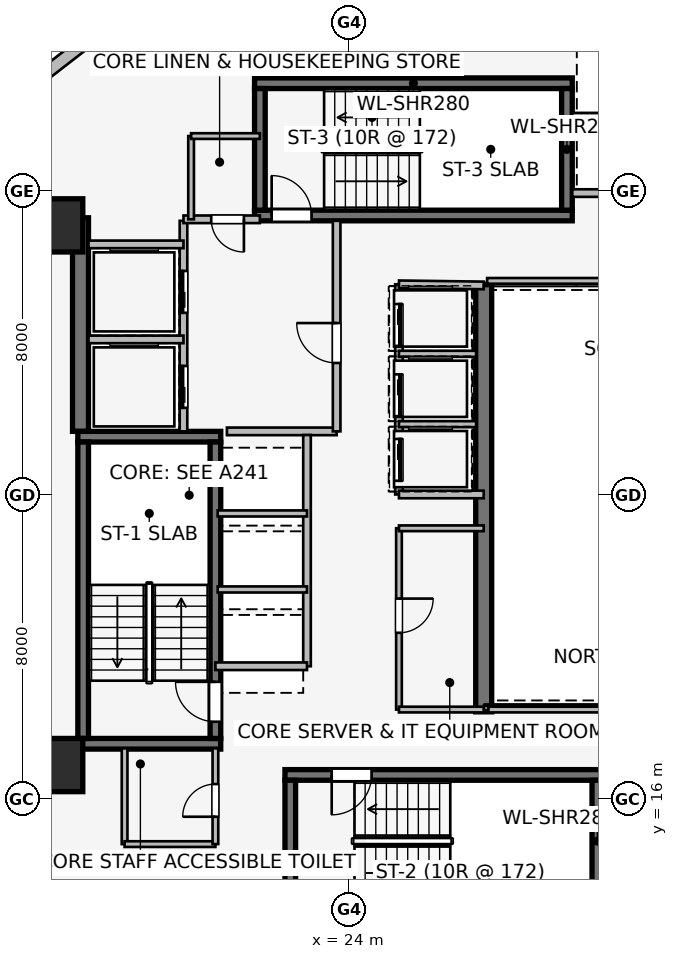
"""IFC4 building model, lengths in metres.
Left out: names, types, materials, properties, quantities, classifications, styles, units other than length and angle.
Written with IfcOpenShell. Run it as: python <this file> out.ifc"""

import sys

from ifc_helpers import new_model, si_unit, direction, frame, frame_2d, origin, origin_2d, place, context, subcontext, project, spatial, rectangle, extrude, element, fill, save


model = new_model("IFC4")
c1 = context("Model", 3, precision=1e-05, world=origin(), true_north=direction((0.0, 1.0)))
c2 = subcontext(c1, "Body", "Model", "MODEL_VIEW")
j1 = project(units=[si_unit("LENGTHUNIT", "METRE"), si_unit("PLANEANGLEUNIT", "RADIAN")], contexts=[c1])
p1 = place(None, origin())
s1 = spatial("IfcSite", under=j1, at=p1, CompositionType="ELEMENT")
p2 = place(p1, origin())
s2 = spatial("IfcBuilding", under=s1, at=p2, CompositionType="ELEMENT")
p3 = place(p2, frame((0.0, 0.0, 146.4)))
s3 = spatial("IfcBuildingStorey", under=s2, at=p3, CompositionType="ELEMENT", Elevation=146.4)
p4 = place(p3, frame((16.94, 25.68, 0.0), z_axis=(0.0, 0.0, 1.0), x_axis=(0.0, 1.0, 0.0)))
e1 = element("IfcWall", 1, at=p4, inside=s3, PredefinedType="SHEAR", context=c2, shape_type="SweptSolid", body=[
    extrude(rectangle(XDim=5.62, YDim=0.42, at=frame_2d((2.81, 0.0))), origin(), (0.0, 0.0, 1.0), 3.45),
])
p5 = place(p3, frame((27.55, 29.55, 0.0), z_axis=(0.0, 0.0, 1.0), x_axis=(0.0, -1.0, 0.0)))
e2 = element("IfcWall", 2, at=p5, inside=s3, PredefinedType="SHEAR", context=c2, shape_type="SweptSolid", body=[
    extrude(rectangle(XDim=11.25, YDim=0.42, at=frame_2d((5.625, 0.0))), origin(), (0.0, 0.0, 1.0), 3.45),
])
for number, where, z_axis, x_axis in (
    (3, (16.87, 17.46, 0.0), (0.0, 0.0, 1.0), (1.0, 0.0, 0.0)),
    (4, (20.63, 25.54, 0.0), (0.0, 0.0, 1.0), (-1.0, 0.0, 0.0)),
):
    element("IfcWall", number, at=place(p3, frame(where, z_axis=z_axis, x_axis=x_axis)), inside=s3, PredefinedType="SHEAR", context=c2, shape_type="SweptSolid", body=[
        extrude(rectangle(XDim=3.76, YDim=0.28, at=frame_2d((1.88, 0.0))), origin(), (0.0, 0.0, 1.0), 3.45),
    ])
p6 = place(p3, frame((17.01, 25.4, 0.0), z_axis=(0.0, 0.0, 1.0), x_axis=(0.0, -1.0, 0.0)))
e5 = element("IfcWall", 5, at=p6, inside=s3, PredefinedType="SHEAR", context=c2, shape_type="SweptSolid", body=[
    extrude(rectangle(XDim=7.8, YDim=0.28, at=frame_2d((3.9, 0.0))), origin(), (0.0, 0.0, 1.0), 3.45),
])
p7 = place(p3, frame((20.49, 17.6, 0.0), z_axis=(0.0, 0.0, 1.0), x_axis=(0.0, 1.0, 0.0)))
e6 = element("IfcWall", 6, at=p7, inside=s3, PredefinedType="SHEAR", context=c2, shape_type="SweptSolid", body=[
    extrude(rectangle(XDim=7.8, YDim=0.28, at=frame_2d((3.9, 0.0))), origin(), (0.0, 0.0, 1.0), 3.45),
])
p8 = place(p7, frame((0.44, 0.0, 0.0)))
e7 = element("IfcOpeningElement", 7, at=p8, cuts=e6, PredefinedType="OPENING", context=c2, shape_type="SweptSolid", body=[
    extrude(rectangle(XDim=1.05, YDim=2.0, at=frame_2d((0.525, 1.0))), frame((0.0, 0.15, 0.0), z_axis=(0.0, -1.0, 0.0), x_axis=(1.0, 0.0, 0.0)), (0.0, 0.0, 1.0), 0.3),
])
p9 = place(p3, frame((30.68, 16.64, 0.0), z_axis=(0.0, 0.0, 1.0), x_axis=(-1.0, 0.0, 0.0)))
e8 = element("IfcWall", 8, at=p9, inside=s3, PredefinedType="SHEAR", context=c2, shape_type="SweptSolid", body=[
    extrude(rectangle(XDim=8.36, YDim=0.28, at=frame_2d((4.18, 0.0))), origin(), (0.0, 0.0, 1.0), 3.45),
])
p10 = place(p9, frame((6.08, 0.0, 0.0)))
e9 = element("IfcOpeningElement", 9, at=p10, cuts=e8, PredefinedType="OPENING", context=c2, shape_type="SweptSolid", body=[
    extrude(rectangle(XDim=1.05, YDim=2.0, at=frame_2d((0.525, 1.0))), frame((0.0, 0.15, 0.0), z_axis=(0.0, -1.0, 0.0), x_axis=(1.0, 0.0, 0.0)), (0.0, 0.0, 1.0), 0.3),
])
for number, where, z_axis, x_axis in (
    (10, (22.46, 16.5, 0.0), (0.0, 0.0, 1.0), (0.0, -1.0, 0.0)),
    (11, (30.54, 13.3, 0.0), (0.0, 0.0, 1.0), (0.0, 1.0, 0.0)),
):
    element("IfcWall", number, at=place(p3, frame(where, z_axis=z_axis, x_axis=x_axis)), inside=s3, PredefinedType="SHEAR", context=c2, shape_type="SweptSolid", body=[
        extrude(rectangle(XDim=3.2, YDim=0.28, at=frame_2d((1.6, 0.0))), origin(), (0.0, 0.0, 1.0), 3.45),
    ])
p11 = place(p3, frame((21.52, 31.36, 0.0), z_axis=(0.0, 0.0, 1.0), x_axis=(1.0, 0.0, 0.0)))
e12 = element("IfcWall", 12, at=p11, inside=s3, PredefinedType="SHEAR", context=c2, shape_type="SweptSolid", body=[
    extrude(rectangle(XDim=8.36, YDim=0.28, at=frame_2d((4.18, 0.0))), origin(), (0.0, 0.0, 1.0), 3.45),
])
p12 = place(p11, frame((0.45, 0.0, 0.0)))
e13 = element("IfcOpeningElement", 13, at=p12, cuts=e12, PredefinedType="OPENING", context=c2, shape_type="SweptSolid", body=[
    extrude(rectangle(XDim=1.05, YDim=2.0, at=frame_2d((0.525, 1.0))), frame((0.0, 0.15, 0.0), z_axis=(0.0, -1.0, 0.0), x_axis=(1.0, 0.0, 0.0)), (0.0, 0.0, 1.0), 0.3),
])
p13 = place(p3, frame((29.88, 34.84, 0.0), z_axis=(0.0, 0.0, 1.0), x_axis=(-1.0, 0.0, 0.0)))
e14 = element("IfcWall", 14, at=p13, inside=s3, PredefinedType="SHEAR", context=c2, shape_type="SweptSolid", body=[
    extrude(rectangle(XDim=8.36, YDim=0.28, at=frame_2d((4.18, 0.0))), origin(), (0.0, 0.0, 1.0), 3.45),
])
for number, where, z_axis, x_axis in (
    (15, (21.66, 34.7, 0.0), (0.0, 0.0, 1.0), (0.0, -1.0, 0.0)),
    (16, (29.74, 31.5, 0.0), (0.0, 0.0, 1.0), (0.0, 1.0, 0.0)),
):
    element("IfcWall", number, at=place(p3, frame(where, z_axis=z_axis, x_axis=x_axis)), inside=s3, PredefinedType="SHEAR", context=c2, shape_type="SweptSolid", body=[
        extrude(rectangle(XDim=3.2, YDim=0.28, at=frame_2d((1.6, 0.0))), origin(), (0.0, 0.0, 1.0), 3.45),
    ])
for number, where, z_axis, x_axis in (
    (17, (16.3, 16.9, 0.0), (0.0, 0.0, 1.0), (1.0, 0.0, 0.0)),
    (18, (16.3, 31.1, 0.0), (0.0, 0.0, 1.0), (1.0, 0.0, 0.0)),
):
    element("IfcColumn", number, at=place(p3, frame(where, z_axis=z_axis, x_axis=x_axis)), inside=s3, PredefinedType="COLUMN", context=c2, shape_type="SweptSolid", body=[
        extrude(rectangle(XDim=1.4, YDim=1.4, at=origin_2d()), origin(), (0.0, 0.0, 1.0), 3.45),
    ])
p14 = place(p3, frame((15.918, 35.024, 0.0), z_axis=(0.0, 0.0, 1.0), x_axis=(0.790621329885, 0.612305408053, 0.0)))
e19 = element("IfcWall", 19, at=p14, inside=s3, PredefinedType="STANDARD", context=c2, shape_type="SweptSolid", body=[
    extrude(rectangle(XDim=1.676, YDim=0.33, at=frame_2d((0.838, 0.0))), origin(), (0.0, 0.0, 1.0), 3.19),
])
p15 = place(p3, frame((19.65, 25.68, 0.0), z_axis=(0.0, 0.0, 1.0), x_axis=(0.0, 1.0, 0.0)))
e20 = element("IfcWall", 20, at=p15, inside=s3, PredefinedType="PARTITIONING", context=c2, shape_type="SweptSolid", body=[
    extrude(rectangle(XDim=5.54, YDim=0.2, at=frame_2d((2.77, 0.0))), origin(), (0.0, 0.0, 1.0), 3.19),
])
p16 = place(p15, frame((0.62, 0.0, 0.0)))
e21 = element("IfcOpeningElement", 21, at=p16, cuts=e20, PredefinedType="OPENING", context=c2, shape_type="SweptSolid", body=[
    extrude(rectangle(XDim=1.1, YDim=2.2, at=frame_2d((0.55, 1.1))), frame((0.0, 0.11, 0.0), z_axis=(0.0, -1.0, 0.0), x_axis=(1.0, 0.0, 0.0)), (0.0, 0.0, 1.0), 0.22),
])
p17 = place(p15, frame((3.12, 0.0, 0.0)))
e22 = element("IfcOpeningElement", 22, at=p17, cuts=e20, PredefinedType="OPENING", context=c2, shape_type="SweptSolid", body=[
    extrude(rectangle(XDim=1.1, YDim=2.2, at=frame_2d((0.55, 1.1))), frame((0.0, 0.11, 0.0), z_axis=(0.0, -1.0, 0.0), x_axis=(1.0, 0.0, 0.0)), (0.0, 0.0, 1.0), 0.22),
])
p18 = place(p3, frame((20.793, 25.68, 0.0), z_axis=(0.0, 0.0, 1.0), x_axis=(1.0, 0.0, 0.0)))
e23 = element("IfcWall", 23, at=p18, inside=s3, PredefinedType="PARTITIONING", context=c2, shape_type="SweptSolid", body=[
    extrude(rectangle(XDim=2.887, YDim=0.2, at=frame_2d((1.443, 0.0))), origin(), (0.0, 0.0, 1.0), 3.19),
])
p19 = place(p3, frame((23.68, 25.68, 0.0), z_axis=(0.0, 0.0, 1.0), x_axis=(0.0, 1.0, 0.0)))
e24 = element("IfcWall", 24, at=p19, inside=s3, PredefinedType="PARTITIONING", context=c2, shape_type="SweptSolid", body=[
    extrude(rectangle(XDim=5.54, YDim=0.2, at=frame_2d((2.77, 0.0))), origin(), (0.0, 0.0, 1.0), 3.19),
])
p20 = place(p19, frame((1.8, 0.0, 0.0)))
e25 = element("IfcOpeningElement", 25, at=p20, cuts=e24, PredefinedType="OPENING", context=c2, shape_type="SweptSolid", body=[
    extrude(rectangle(XDim=1.05, YDim=2.0, at=frame_2d((0.525, 1.0))), frame((0.0, 0.11, 0.0), z_axis=(0.0, -1.0, 0.0), x_axis=(1.0, 0.0, 0.0)), (0.0, 0.0, 1.0), 0.22),
])
p21 = place(p3, frame((21.66, 31.26, 0.0), z_axis=(0.0, 0.0, 1.0), x_axis=(-1.0, 0.0, 0.0)))
e26 = element("IfcWall", 26, at=p21, inside=s3, PredefinedType="PARTITIONING", context=c2, shape_type="SweptSolid", body=[
    extrude(rectangle(XDim=2.01, YDim=0.2, at=frame_2d((1.005, 0.0))), origin(), (0.0, 0.0, 1.0), 3.19),
])
p22 = place(p21, frame((0.42, 0.0, 0.0)))
e27 = element("IfcOpeningElement", 27, at=p22, cuts=e26, PredefinedType="OPENING", context=c2, shape_type="SweptSolid", body=[
    extrude(rectangle(XDim=0.86, YDim=2.0, at=frame_2d((0.43, 1.0))), frame((0.0, 0.11, 0.0), z_axis=(0.0, -1.0, 0.0), x_axis=(1.0, 0.0, 0.0)), (0.0, 0.0, 1.0), 0.22),
])
p23 = place(p3, frame((17.15, 28.1, 0.0), z_axis=(0.0, 0.0, 1.0), x_axis=(1.0, 0.0, 0.0)))
e28 = element("IfcWall", 28, at=p23, inside=s3, PredefinedType="PARTITIONING", context=c2, shape_type="SweptSolid", body=[
    extrude(rectangle(XDim=2.5, YDim=0.2, at=frame_2d((1.25, 0.0))), origin(), (0.0, 0.0, 1.0), 3.19),
])
p24 = place(p3, frame((19.65, 30.6, 0.0), z_axis=(0.0, 0.0, 1.0), x_axis=(-1.0, 0.0, 0.0)))
e29 = element("IfcWall", 29, at=p24, inside=s3, PredefinedType="PARTITIONING", context=c2, shape_type="SweptSolid", body=[
    extrude(rectangle(XDim=2.5, YDim=0.2, at=frame_2d((1.25, 0.0))), origin(), (0.0, 0.0, 1.0), 2.09),
])
p25 = place(p3, frame((32.48, 31.95, 0.0), z_axis=(0.0, 0.0, 1.0), x_axis=(-1.0, 0.0, 0.0)))
e30 = element("IfcWall", 30, at=p25, inside=s3, PredefinedType="PARTITIONING", context=c2, shape_type="SweptSolid", body=[
    extrude(rectangle(XDim=2.6, YDim=0.2, at=frame_2d((1.3, 0.0))), origin(), (0.0, 0.0, 1.0), 3.19),
])
p26 = place(p3, frame((29.875, 33.98, 0.0), z_axis=(0.0, 0.0, 1.0), x_axis=(1.0, 0.0, 0.0)))
e31 = element("IfcWall", 31, at=p26, inside=s3, PredefinedType="PARTITIONING", context=c2, shape_type="SweptSolid", body=[
    extrude(rectangle(XDim=2.605, YDim=0.16, at=frame_2d((1.302, 0.0))), origin(), (0.0, 0.0, 1.0), 3.19),
])
p27 = place(p3, frame((22.9, 19.5, 0.0), z_axis=(0.0, 0.0, 1.0), x_axis=(0.0, 1.0, 0.0)))
e32 = element("IfcWall", 32, at=p27, inside=s3, PredefinedType="PARTITIONING", context=c2, shape_type="SweptSolid", body=[
    extrude(rectangle(XDim=6.085, YDim=0.2, at=frame_2d((3.042, 0.0))), origin(), (0.0, 0.0, 1.0), 3.19),
])
p28 = place(p3, frame((20.49, 19.5, 0.0), z_axis=(0.0, 0.0, 1.0), x_axis=(1.0, 0.0, 0.0)))
e33 = element("IfcWall", 33, at=p28, inside=s3, PredefinedType="PARTITIONING", context=c2, shape_type="SweptSolid", body=[
    extrude(rectangle(XDim=2.41, YDim=0.2, at=frame_2d((1.205, 0.0))), origin(), (0.0, 0.0, 1.0), 2.09),
])
for number, where, z_axis, x_axis in (
    (34, (20.55, 21.52, 0.0), (0.0, 0.0, 1.0), (1.0, 0.0, 0.0)),
    (35, (20.55, 23.52, 0.0), (0.0, 0.0, 1.0), (1.0, 0.0, 0.0)),
):
    element("IfcWall", number, at=place(p3, frame(where, z_axis=z_axis, x_axis=x_axis)), inside=s3, PredefinedType="PARTITIONING", context=c2, shape_type="SweptSolid", body=[
        extrude(rectangle(XDim=2.35, YDim=0.16, at=frame_2d((1.175, 0.0))), origin(), (0.0, 0.0, 1.0), 3.19),
    ])
p29 = place(p3, frame((25.32, 29.55, 0.0), z_axis=(0.0, 0.0, 1.0), x_axis=(0.0, -1.0, 0.0)))
e36 = element("IfcWall", 36, at=p29, inside=s3, PredefinedType="PARTITIONING", context=c2, shape_type="SweptSolid", body=[
    extrude(rectangle(XDim=5.53, YDim=0.2, at=frame_2d((2.765, 0.0))), origin(), (0.0, 0.0, 1.0), 3.19),
])
p30 = place(p29, frame((0.52, 0.0, 0.0)))
e37 = element("IfcOpeningElement", 37, at=p30, cuts=e36, PredefinedType="OPENING", context=c2, shape_type="SweptSolid", body=[
    extrude(rectangle(XDim=1.1, YDim=2.2, at=frame_2d((0.55, 1.1))), frame((0.0, 0.11, 0.0), z_axis=(0.0, -1.0, 0.0), x_axis=(1.0, 0.0, 0.0)), (0.0, 0.0, 1.0), 0.22),
])
p31 = place(p29, frame((2.37, 0.0, 0.0)))
e38 = element("IfcOpeningElement", 38, at=p31, cuts=e36, PredefinedType="OPENING", context=c2, shape_type="SweptSolid", body=[
    extrude(rectangle(XDim=1.1, YDim=2.2, at=frame_2d((0.55, 1.1))), frame((0.0, 0.11, 0.0), z_axis=(0.0, -1.0, 0.0), x_axis=(1.0, 0.0, 0.0)), (0.0, 0.0, 1.0), 0.22),
])
p32 = place(p29, frame((4.07, 0.0, 0.0)))
e39 = element("IfcOpeningElement", 39, at=p32, cuts=e36, PredefinedType="OPENING", context=c2, shape_type="SweptSolid", body=[
    extrude(rectangle(XDim=1.1, YDim=2.2, at=frame_2d((0.55, 1.1))), frame((0.0, 0.11, 0.0), z_axis=(0.0, -1.0, 0.0), x_axis=(1.0, 0.0, 0.0)), (0.0, 0.0, 1.0), 0.22),
])
p33 = place(p3, frame((27.55, 29.52, 0.0), z_axis=(0.0, 0.0, 1.0), x_axis=(-0.999909343457, 0.013464949556, 0.0)))
e40 = element("IfcWall", 40, at=p33, inside=s3, PredefinedType="PARTITIONING", context=c2, shape_type="SweptSolid", body=[
    extrude(rectangle(XDim=2.23, YDim=0.2, at=frame_2d((1.115, 0.0))), origin(), (0.0, 0.0, 1.0), 2.09),
])
p34 = place(p3, frame((25.32, 24.02, 0.0), z_axis=(0.0, 0.0, 1.0), x_axis=(1.0, 0.0, 0.0)))
e41 = element("IfcWall", 41, at=p34, inside=s3, PredefinedType="PARTITIONING", context=c2, shape_type="SweptSolid", body=[
    extrude(rectangle(XDim=2.23, YDim=0.2, at=frame_2d((1.115, 0.0))), origin(), (0.0, 0.0, 1.0), 3.19),
])
for number, where, z_axis, x_axis in (
    (42, (25.32, 25.87, 0.0), (0.0, 0.0, 1.0), (1.0, 0.0, 0.0)),
    (43, (25.32, 27.72, 0.0), (0.0, 0.0, 1.0), (1.0, 0.0, 0.0)),
):
    element("IfcWall", number, at=place(p3, frame(where, z_axis=z_axis, x_axis=x_axis)), inside=s3, PredefinedType="PARTITIONING", context=c2, shape_type="SweptSolid", body=[
        extrude(rectangle(XDim=2.03, YDim=0.16, at=frame_2d((1.015, 0.0))), origin(), (0.0, 0.0, 1.0), 3.19),
    ])
p35 = place(p3, frame((25.32, 23.13, 0.0), z_axis=(0.0, 0.0, 1.0), x_axis=(0.0, -1.0, 0.0)))
e44 = element("IfcWall", 44, at=p35, inside=s3, PredefinedType="PARTITIONING", context=c2, shape_type="SweptSolid", body=[
    extrude(rectangle(XDim=4.77, YDim=0.15, at=frame_2d((2.385, 0.0))), origin(), (0.0, 0.0, 1.0), 3.19),
])
p36 = place(p35, frame((1.85, 0.0, 0.0)))
e45 = element("IfcOpeningElement", 45, at=p36, cuts=e44, PredefinedType="OPENING", context=c2, shape_type="SweptSolid", body=[
    extrude(rectangle(XDim=0.9, YDim=2.0, at=frame_2d((0.45, 1.0))), frame((0.0, 0.085, 0.0), z_axis=(0.0, -1.0, 0.0), x_axis=(1.0, 0.0, 0.0)), (0.0, 0.0, 1.0), 0.17),
])
for number, where, z_axis, x_axis in (
    (46, (25.32, 23.13, 0.0), (0.0, 0.0, 1.0), (1.0, 0.0, 0.0)),
    (47, (25.32, 18.36, 0.0), (0.0, 0.0, 1.0), (1.0, 0.0, 0.0)),
):
    element("IfcWall", number, at=place(p3, frame(where, z_axis=z_axis, x_axis=x_axis)), inside=s3, PredefinedType="PARTITIONING", context=c2, shape_type="SweptSolid", body=[
        extrude(rectangle(XDim=2.23, YDim=0.15, at=frame_2d((1.115, 0.0))), origin(), (0.0, 0.0, 1.0), 3.19),
    ])
p37 = place(p3, frame((18.1, 17.34, 0.0), z_axis=(0.0, 0.0, 1.0), x_axis=(0.0, -1.0, 0.0)))
e48 = element("IfcWall", 48, at=p37, inside=s3, PredefinedType="PARTITIONING", context=c2, shape_type="SweptSolid", body=[
    extrude(rectangle(XDim=2.52, YDim=0.15, at=frame_2d((1.26, 0.0))), origin(), (0.0, 0.0, 1.0), 3.19),
])
p38 = place(p3, frame((18.1, 14.82, 0.0), z_axis=(0.0, 0.0, 1.0), x_axis=(1.0, 0.0, 0.0)))
e49 = element("IfcWall", 49, at=p38, inside=s3, PredefinedType="PARTITIONING", context=c2, shape_type="SweptSolid", body=[
    extrude(rectangle(XDim=2.39, YDim=0.15, at=frame_2d((1.195, 0.0))), origin(), (0.0, 0.0, 1.0), 3.19),
])
p39 = place(p3, frame((20.49, 14.82, 0.0), z_axis=(0.0, 0.0, 1.0), x_axis=(0.0, 1.0, 0.0)))
e50 = element("IfcWall", 50, at=p39, inside=s3, PredefinedType="PARTITIONING", context=c2, shape_type="SweptSolid", body=[
    extrude(rectangle(XDim=2.52, YDim=0.15, at=frame_2d((1.26, 0.0))), origin(), (0.0, 0.0, 1.0), 3.19),
])
p40 = place(p39, frame((0.72, 0.0, 0.0)))
e51 = element("IfcOpeningElement", 51, at=p40, cuts=e50, PredefinedType="OPENING", context=c2, shape_type="SweptSolid", body=[
    extrude(rectangle(XDim=0.86, YDim=2.0, at=frame_2d((0.43, 1.0))), frame((0.0, 0.085, 0.0), z_axis=(0.0, -1.0, 0.0), x_axis=(1.0, 0.0, 0.0)), (0.0, 0.0, 1.0), 0.17),
])
p41 = place(p3, frame((19.85, 33.45, 0.0), z_axis=(0.0, 0.0, 1.0), x_axis=(0.0, -1.0, 0.0)))
e52 = element("IfcWall", 52, at=p41, inside=s3, PredefinedType="PARTITIONING", context=c2, shape_type="SweptSolid", body=[
    extrude(rectangle(XDim=2.19, YDim=0.15, at=frame_2d((1.095, 0.0))), origin(), (0.0, 0.0, 1.0), 3.19),
])
p42 = place(p3, frame((21.66, 33.45, 0.0), z_axis=(0.0, 0.0, 1.0), x_axis=(-1.0, 0.0, 0.0)))
e53 = element("IfcWall", 53, at=p42, inside=s3, PredefinedType="PARTITIONING", context=c2, shape_type="SweptSolid", body=[
    extrude(rectangle(XDim=1.81, YDim=0.15, at=frame_2d((0.905, 0.0))), origin(), (0.0, 0.0, 1.0), 3.19),
])
p43 = place(p3, frame((27.675, 18.36, 0.0), z_axis=(0.0, 0.0, 1.0), x_axis=(1.0, 0.0, 0.0)))
e54 = element("IfcWall", 54, at=p43, inside=s3, PredefinedType="PARTITIONING", context=c2, shape_type="SweptSolid", body=[
    extrude(rectangle(XDim=12.165, YDim=0.15, at=frame_2d((6.083, 0.0))), origin(), (0.0, 0.0, 1.0), 2.331),
])
p44 = place(p3, frame((39.84, 29.64, 0.0), z_axis=(0.0, 0.0, 1.0), x_axis=(-1.0, 0.0, 0.0)))
e55 = element("IfcWall", 55, at=p44, inside=s3, PredefinedType="PARTITIONING", context=c2, shape_type="SweptSolid", body=[
    extrude(rectangle(XDim=12.2, YDim=0.15, at=frame_2d((6.1, 0.0))), origin(), (0.0, 0.0, 1.0), 2.331),
])
p45 = place(p8, origin())
e56 = element("IfcDoor", 56, at=p45, inside=s3, OperationType="SINGLE_SWING_RIGHT", PredefinedType="DOOR", context=c2, shape_type="SweptSolid", body=[
    extrude(rectangle(XDim=1.05, YDim=2.0, at=frame_2d((0.525, 1.0))), frame((0.0, 0.025, 0.0), z_axis=(0.0, -1.0, 0.0), x_axis=(1.0, 0.0, 0.0)), (0.0, 0.0, 1.0), 0.05),
])
fill(e7, e56)
p46 = place(p10, origin())
e57 = element("IfcDoor", 57, at=p46, inside=s3, OperationType="SINGLE_SWING_RIGHT", PredefinedType="DOOR", context=c2, shape_type="SweptSolid", body=[
    extrude(rectangle(XDim=1.05, YDim=2.0, at=frame_2d((0.525, 1.0))), frame((0.0, 0.025, 0.0), z_axis=(0.0, -1.0, 0.0), x_axis=(1.0, 0.0, 0.0)), (0.0, 0.0, 1.0), 0.05),
])
fill(e9, e57)
p47 = place(p12, origin())
e58 = element("IfcDoor", 58, at=p47, inside=s3, OperationType="SINGLE_SWING_LEFT", PredefinedType="DOOR", context=c2, shape_type="SweptSolid", body=[
    extrude(rectangle(XDim=1.05, YDim=2.0, at=frame_2d((0.525, 1.0))), frame((0.0, 0.025, 0.0), z_axis=(0.0, -1.0, 0.0), x_axis=(1.0, 0.0, 0.0)), (0.0, 0.0, 1.0), 0.05),
])
fill(e13, e58)
p48 = place(p16, origin())
e59 = element("IfcDoor", 59, at=p48, inside=s3, OperationType="SLIDING_TO_LEFT", PredefinedType="DOOR", context=c2, shape_type="SweptSolid", body=[
    extrude(rectangle(XDim=1.1, YDim=2.2, at=frame_2d((0.55, 1.1))), frame((0.0, 0.025, 0.0), z_axis=(0.0, -1.0, 0.0), x_axis=(1.0, 0.0, 0.0)), (0.0, 0.0, 1.0), 0.05),
])
fill(e21, e59)
p49 = place(p17, origin())
e60 = element("IfcDoor", 60, at=p49, inside=s3, OperationType="SLIDING_TO_LEFT", PredefinedType="DOOR", context=c2, shape_type="SweptSolid", body=[
    extrude(rectangle(XDim=1.1, YDim=2.2, at=frame_2d((0.55, 1.1))), frame((0.0, 0.025, 0.0), z_axis=(0.0, -1.0, 0.0), x_axis=(1.0, 0.0, 0.0)), (0.0, 0.0, 1.0), 0.05),
])
fill(e22, e60)
p50 = place(p20, origin())
e61 = element("IfcDoor", 61, at=p50, inside=s3, OperationType="SINGLE_SWING_RIGHT", PredefinedType="DOOR", context=c2, shape_type="SweptSolid", body=[
    extrude(rectangle(XDim=1.05, YDim=2.0, at=frame_2d((0.525, 1.0))), frame((0.0, 0.025, 0.0), z_axis=(0.0, -1.0, 0.0), x_axis=(1.0, 0.0, 0.0)), (0.0, 0.0, 1.0), 0.05),
])
fill(e25, e61)
p51 = place(p22, origin())
e62 = element("IfcDoor", 62, at=p51, inside=s3, OperationType="SINGLE_SWING_LEFT", PredefinedType="DOOR", context=c2, shape_type="SweptSolid", body=[
    extrude(rectangle(XDim=0.86, YDim=2.0, at=frame_2d((0.43, 1.0))), frame((0.0, 0.025, 0.0), z_axis=(0.0, -1.0, 0.0), x_axis=(1.0, 0.0, 0.0)), (0.0, 0.0, 1.0), 0.05),
])
fill(e27, e62)
p52 = place(p30, origin())
e63 = element("IfcDoor", 63, at=p52, inside=s3, OperationType="SLIDING_TO_LEFT", PredefinedType="DOOR", context=c2, shape_type="SweptSolid", body=[
    extrude(rectangle(XDim=1.1, YDim=2.2, at=frame_2d((0.55, 1.1))), frame((0.0, 0.025, 0.0), z_axis=(0.0, -1.0, 0.0), x_axis=(1.0, 0.0, 0.0)), (0.0, 0.0, 1.0), 0.05),
])
fill(e37, e63)
p53 = place(p31, origin())
e64 = element("IfcDoor", 64, at=p53, inside=s3, OperationType="SLIDING_TO_LEFT", PredefinedType="DOOR", context=c2, shape_type="SweptSolid", body=[
    extrude(rectangle(XDim=1.1, YDim=2.2, at=frame_2d((0.55, 1.1))), frame((0.0, 0.025, 0.0), z_axis=(0.0, -1.0, 0.0), x_axis=(1.0, 0.0, 0.0)), (0.0, 0.0, 1.0), 0.05),
])
fill(e38, e64)
p54 = place(p32, origin())
e65 = element("IfcDoor", 65, at=p54, inside=s3, OperationType="SLIDING_TO_LEFT", PredefinedType="DOOR", context=c2, shape_type="SweptSolid", body=[
    extrude(rectangle(XDim=1.1, YDim=2.2, at=frame_2d((0.55, 1.1))), frame((0.0, 0.025, 0.0), z_axis=(0.0, -1.0, 0.0), x_axis=(1.0, 0.0, 0.0)), (0.0, 0.0, 1.0), 0.05),
])
fill(e39, e65)
p55 = place(p36, origin())
e66 = element("IfcDoor", 66, at=p55, inside=s3, OperationType="SINGLE_SWING_LEFT", PredefinedType="DOOR", context=c2, shape_type="SweptSolid", body=[
    extrude(rectangle(XDim=0.9, YDim=2.0, at=frame_2d((0.45, 1.0))), frame((0.0, 0.025, 0.0), z_axis=(0.0, -1.0, 0.0), x_axis=(1.0, 0.0, 0.0)), (0.0, 0.0, 1.0), 0.05),
])
fill(e45, e66)
p56 = place(p40, origin())
e67 = element("IfcDoor", 67, at=p56, inside=s3, OperationType="SINGLE_SWING_LEFT", PredefinedType="DOOR", context=c2, shape_type="SweptSolid", body=[
    extrude(rectangle(XDim=0.86, YDim=2.0, at=frame_2d((0.43, 1.0))), frame((0.0, 0.025, 0.0), z_axis=(0.0, -1.0, 0.0), x_axis=(1.0, 0.0, 0.0)), (0.0, 0.0, 1.0), 0.05),
])
fill(e51, e67)
save(model, sys.argv[1])
